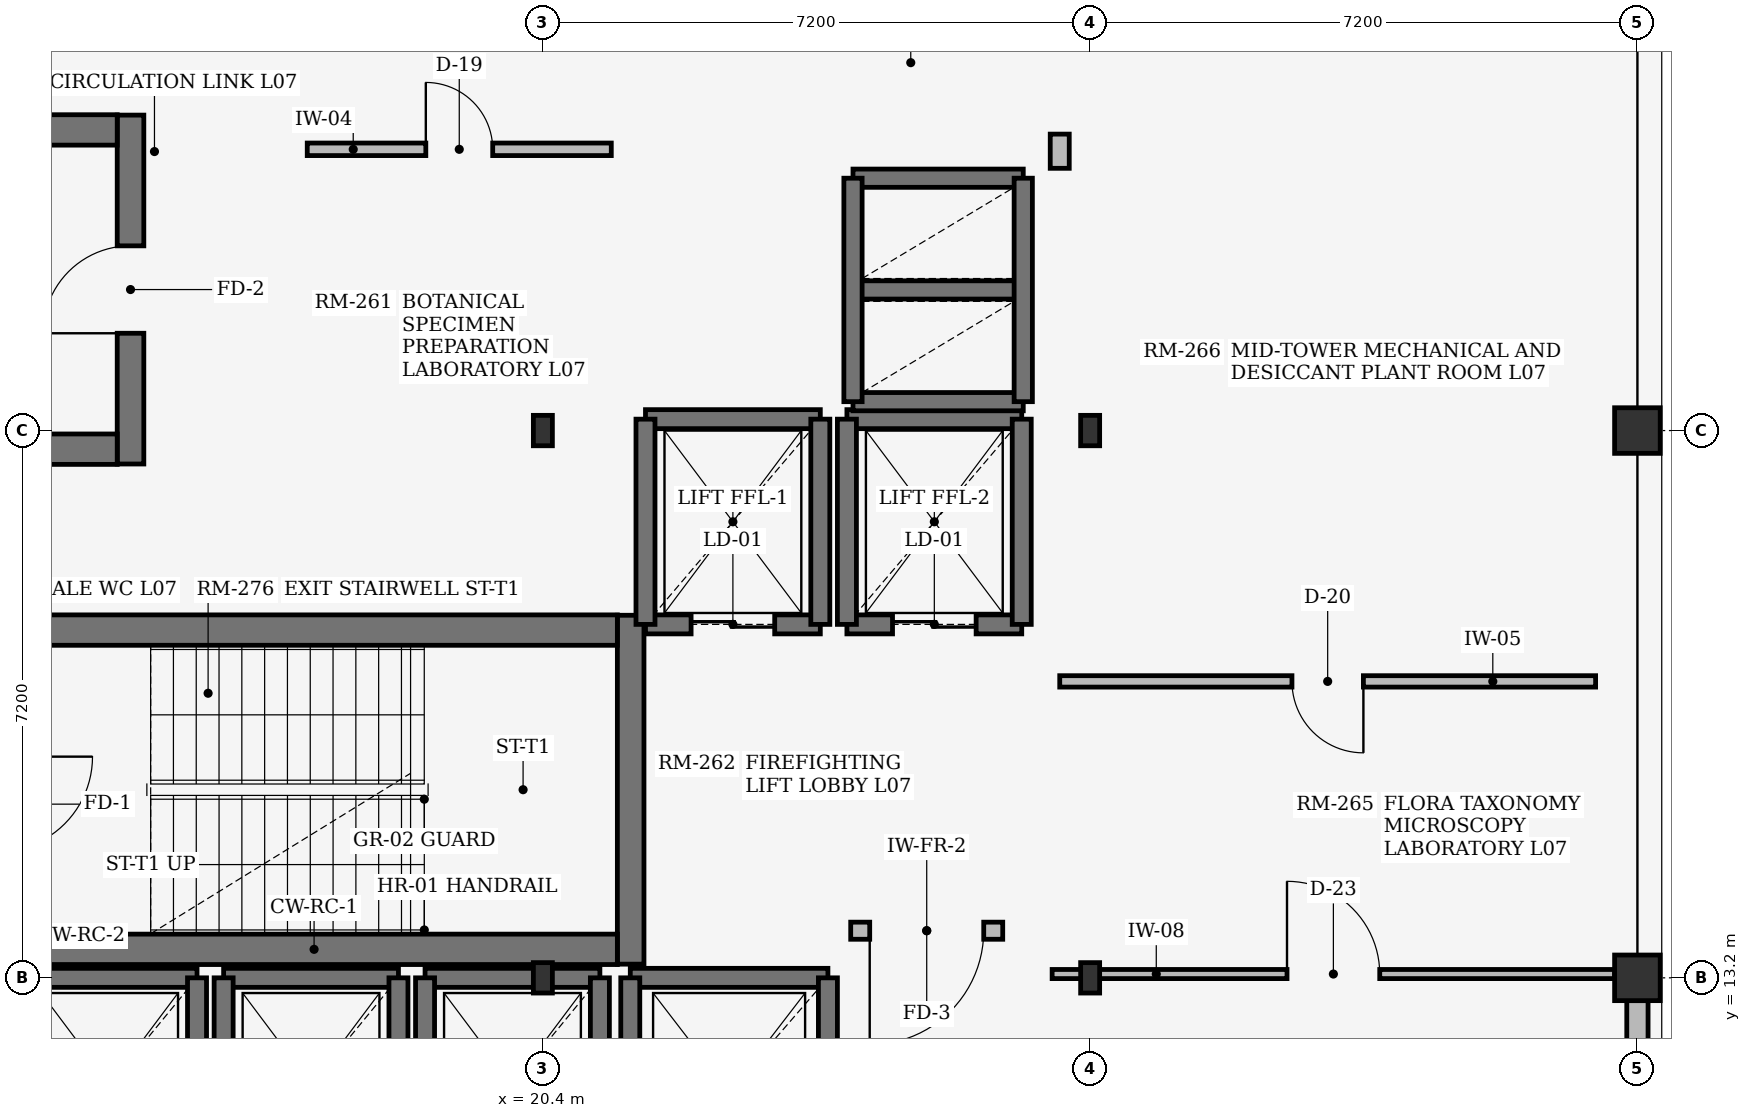
"""IFC4 building model, lengths in metres.
Left out: names, types, materials, properties, quantities, classifications, styles, units other than length and angle.
Written with IfcOpenShell. Run it as: python <this file> out.ifc"""

import sys

from ifc_helpers import new_model, si_unit, direction, frame, frame_2d, origin, origin_2d, place, context, subcontext, project, spatial, rectangle, i_section, extrude, element, fill, save


model = new_model("IFC4")
c1 = context("Model", 3, precision=1e-05, world=origin(), true_north=direction((0.0, 1.0)))
c2 = subcontext(c1, "Body", "Model", "MODEL_VIEW")
j1 = project(units=[si_unit("LENGTHUNIT", "METRE"), si_unit("PLANEANGLEUNIT", "RADIAN")], contexts=[c1])
p1 = place(None, origin())
s1 = spatial("IfcSite", under=j1, at=p1, CompositionType="ELEMENT")
p2 = place(p1, origin())
s2 = spatial("IfcBuilding", under=s1, at=p2, CompositionType="ELEMENT")
p3 = place(p2, frame((0.0, 0.0, 28.8)))
s3 = spatial("IfcBuildingStorey", under=s2, at=p3, CompositionType="ELEMENT", Elevation=28.8)
for number, where, z_axis, x_axis in (
    (1, (20.4, 13.2, 0.0), (0.0, 0.0, 1.0), (1.0, 0.0, 0.0)),
    (2, (20.4, 20.4, 0.0), (0.0, 0.0, 1.0), (1.0, 0.0, 0.0)),
    (3, (27.6, 13.2, 0.0), (0.0, 0.0, 1.0), (1.0, 0.0, 0.0)),
    (4, (27.6, 20.4, 0.0), (0.0, 0.0, 1.0), (1.0, 0.0, 0.0)),
):
    element("IfcColumn", number, at=place(p3, frame(where, z_axis=z_axis, x_axis=x_axis)), inside=s3, PredefinedType="COLUMN", context=c2, shape_type="SweptSolid", body=[
        extrude(i_section(OverallWidth=0.25, OverallDepth=0.4, WebThickness=0.01, FlangeThickness=0.013, at=origin_2d()), origin(), (0.0, 0.0, 1.0), 3.62),
    ])
for number, where, z_axis, x_axis in (
    (5, (34.8, 13.2, 0.0), (0.0, 0.0, 1.0), (1.0, 0.0, 0.0)),
    (6, (34.8, 20.4, 0.0), (0.0, 0.0, 1.0), (1.0, 0.0, 0.0)),
):
    element("IfcColumn", number, at=place(p3, frame(where, z_axis=z_axis, x_axis=x_axis)), inside=s3, PredefinedType="COLUMN", context=c2, shape_type="SweptSolid", body=[
        extrude(rectangle(XDim=0.6, YDim=0.6, at=origin_2d()), origin(), (0.0, 0.0, 1.0), 3.62),
    ])
p4 = place(p3, frame((34.8, 6.3, 0.0), z_axis=(0.0, 0.0, 1.0), x_axis=(0.0, 1.0, 0.0)))
e7 = element("IfcWall", 7, at=p4, inside=s3, PredefinedType="STANDARD", context=c2, shape_type="SweptSolid", body=[
    extrude(rectangle(XDim=6.6, YDim=0.28, at=frame_2d((3.3, 0.0))), origin(), (0.0, 0.0, 1.0), 3.1),
])
p5 = place(p4, frame((2.325, 0.0, 0.75)))
e8 = element("IfcOpeningElement", 8, at=p5, cuts=e7, PredefinedType="OPENING", context=c2, shape_type="SweptSolid", body=[
    extrude(rectangle(XDim=1.95, YDim=1.5, at=frame_2d((0.975, 0.75))), frame((0.0, 0.15, 0.0), z_axis=(0.0, -1.0, 0.0), x_axis=(1.0, 0.0, 0.0)), (0.0, 0.0, 1.0), 0.3),
])
p6 = place(p3, frame((21.555, 13.38, 0.0), z_axis=(0.0, 0.0, 1.0), x_axis=(0.0, 1.0, 0.0)))
e9 = element("IfcWall", 9, at=p6, inside=s3, PredefinedType="SHEAR", context=c2, shape_type="SweptSolid", body=[
    extrude(rectangle(XDim=4.59, YDim=0.35, at=frame_2d((2.295, 0.0))), origin(), (0.0, 0.0, 1.0), 3.62),
])
for number, where, z_axis, x_axis in (
    (10, (13.4, 13.575, 0.0), (0.0, 0.0, 1.0), (1.0, 0.0, 0.0)),
    (11, (13.4, 17.775, 0.0), (0.0, 0.0, 1.0), (1.0, 0.0, 0.0)),
):
    element("IfcWall", number, at=place(p3, frame(where, z_axis=z_axis, x_axis=x_axis)), inside=s3, PredefinedType="SHEAR", context=c2, shape_type="SweptSolid", body=[
        extrude(rectangle(XDim=7.98, YDim=0.4, at=frame_2d((3.99, 0.0))), origin(), (0.0, 0.0, 1.0), 3.62),
    ])
p7 = place(p3, frame((14.975, 24.55, 0.0), z_axis=(0.0, 0.0, 1.0), x_axis=(0.0, -1.0, 0.0)))
e12 = element("IfcWall", 12, at=p7, inside=s3, PredefinedType="SHEAR", context=c2, shape_type="SweptSolid", body=[
    extrude(rectangle(XDim=4.59, YDim=0.35, at=frame_2d((2.295, 0.0))), origin(), (0.0, 0.0, 1.0), 3.62),
])
p8 = place(p7, frame((1.72, 0.0, 0.0)))
e13 = element("IfcOpeningElement", 13, at=p8, cuts=e12, PredefinedType="OPENING", context=c2, shape_type="SweptSolid", body=[
    extrude(rectangle(XDim=1.15, YDim=2.2, at=frame_2d((0.575, 1.1))), frame((0.0, 0.185, 0.0), z_axis=(0.0, -1.0, 0.0), x_axis=(1.0, 0.0, 0.0)), (0.0, 0.0, 1.0), 0.37),
])
for number, where, z_axis, x_axis in (
    (14, (14.8, 24.355, 0.0), (0.0, 0.0, 1.0), (-1.0, 0.0, 0.0)),
    (15, (14.8, 20.155, 0.0), (0.0, 0.0, 1.0), (-1.0, 0.0, 0.0)),
):
    element("IfcWall", number, at=place(p3, frame(where, z_axis=z_axis, x_axis=x_axis)), inside=s3, PredefinedType="SHEAR", context=c2, shape_type="SweptSolid", body=[
        extrude(rectangle(XDim=7.98, YDim=0.4, at=frame_2d((3.99, 0.0))), origin(), (0.0, 0.0, 1.0), 3.62),
    ])
p9 = place(p3, frame((21.75, 17.85, 0.0), z_axis=(0.0, 0.0, 1.0), x_axis=(1.0, 0.0, 0.0)))
e16 = element("IfcWall", 16, at=p9, inside=s3, PredefinedType="SHEAR", context=c2, shape_type="SweptSolid", body=[
    extrude(rectangle(XDim=2.3, YDim=0.25, at=frame_2d((1.15, 0.0))), origin(), (0.0, 0.0, 1.0), 3.62),
])
p10 = place(p9, frame((0.6, 0.0, 0.0)))
e17 = element("IfcOpeningElement", 17, at=p10, cuts=e16, PredefinedType="OPENING", context=c2, shape_type="SweptSolid", body=[
    extrude(rectangle(XDim=1.1, YDim=2.2, at=frame_2d((0.55, 1.1))), frame((0.0, 0.135, 0.0), z_axis=(0.0, -1.0, 0.0), x_axis=(1.0, 0.0, 0.0)), (0.0, 0.0, 1.0), 0.27),
])
p11 = place(p3, frame((21.75, 20.55, 0.0), z_axis=(0.0, 0.0, 1.0), x_axis=(1.0, 0.0, 0.0)))
e18 = element("IfcWall", 18, at=p11, inside=s3, PredefinedType="SHEAR", context=c2, shape_type="SweptSolid", body=[
    extrude(rectangle(XDim=2.3, YDim=0.25, at=frame_2d((1.15, 0.0))), origin(), (0.0, 0.0, 1.0), 3.62),
])
for number, where, z_axis, x_axis in (
    (19, (21.75, 17.85, 0.0), (0.0, 0.0, 1.0), (0.0, 1.0, 0.0)),
    (20, (24.05, 17.85, 0.0), (0.0, 0.0, 1.0), (0.0, 1.0, 0.0)),
):
    element("IfcWall", number, at=place(p3, frame(where, z_axis=z_axis, x_axis=x_axis)), inside=s3, PredefinedType="SHEAR", context=c2, shape_type="SweptSolid", body=[
        extrude(rectangle(XDim=2.7, YDim=0.25, at=frame_2d((1.35, 0.0))), origin(), (0.0, 0.0, 1.0), 3.62),
    ])
p12 = place(p3, frame((24.4, 17.85, 0.0), z_axis=(0.0, 0.0, 1.0), x_axis=(1.0, 0.0, 0.0)))
e21 = element("IfcWall", 21, at=p12, inside=s3, PredefinedType="SHEAR", context=c2, shape_type="SweptSolid", body=[
    extrude(rectangle(XDim=2.3, YDim=0.25, at=frame_2d((1.15, 0.0))), origin(), (0.0, 0.0, 1.0), 3.62),
])
p13 = place(p12, frame((0.6, 0.0, 0.0)))
e22 = element("IfcOpeningElement", 22, at=p13, cuts=e21, PredefinedType="OPENING", context=c2, shape_type="SweptSolid", body=[
    extrude(rectangle(XDim=1.1, YDim=2.2, at=frame_2d((0.55, 1.1))), frame((0.0, 0.135, 0.0), z_axis=(0.0, -1.0, 0.0), x_axis=(1.0, 0.0, 0.0)), (0.0, 0.0, 1.0), 0.27),
])
p14 = place(p3, frame((24.4, 20.55, 0.0), z_axis=(0.0, 0.0, 1.0), x_axis=(1.0, 0.0, 0.0)))
e23 = element("IfcWall", 23, at=p14, inside=s3, PredefinedType="SHEAR", context=c2, shape_type="SweptSolid", body=[
    extrude(rectangle(XDim=2.3, YDim=0.25, at=frame_2d((1.15, 0.0))), origin(), (0.0, 0.0, 1.0), 3.62),
])
for number, where, z_axis, x_axis in (
    (24, (24.4, 17.85, 0.0), (0.0, 0.0, 1.0), (0.0, 1.0, 0.0)),
    (25, (26.7, 17.85, 0.0), (0.0, 0.0, 1.0), (0.0, 1.0, 0.0)),
):
    element("IfcWall", number, at=place(p3, frame(where, z_axis=z_axis, x_axis=x_axis)), inside=s3, PredefinedType="SHEAR", context=c2, shape_type="SweptSolid", body=[
        extrude(rectangle(XDim=2.7, YDim=0.25, at=frame_2d((1.35, 0.0))), origin(), (0.0, 0.0, 1.0), 3.62),
    ])
p15 = place(p3, frame((13.55, 13.2, 0.0), z_axis=(0.0, 0.0, 1.0), x_axis=(1.0, 0.0, 0.0)))
e26 = element("IfcWall", 26, at=p15, inside=s3, PredefinedType="SHEAR", context=c2, shape_type="SweptSolid", body=[
    extrude(rectangle(XDim=2.3, YDim=0.25, at=frame_2d((1.15, 0.0))), origin(), (0.0, 0.0, 1.0), 3.62),
])
p16 = place(p3, frame((15.85, 10.4, 0.0), z_axis=(0.0, 0.0, 1.0), x_axis=(0.0, 1.0, 0.0)))
e27 = element("IfcWall", 27, at=p16, inside=s3, PredefinedType="SHEAR", context=c2, shape_type="SweptSolid", body=[
    extrude(rectangle(XDim=2.8, YDim=0.25, at=frame_2d((1.4, 0.0))), origin(), (0.0, 0.0, 1.0), 3.62),
])
p17 = place(p3, frame((16.2, 13.2, 0.0), z_axis=(0.0, 0.0, 1.0), x_axis=(1.0, 0.0, 0.0)))
e28 = element("IfcWall", 28, at=p17, inside=s3, PredefinedType="SHEAR", context=c2, shape_type="SweptSolid", body=[
    extrude(rectangle(XDim=2.3, YDim=0.25, at=frame_2d((1.15, 0.0))), origin(), (0.0, 0.0, 1.0), 3.62),
])
for number, where, z_axis, x_axis in (
    (29, (16.2, 10.4, 0.0), (0.0, 0.0, 1.0), (0.0, 1.0, 0.0)),
    (30, (18.5, 10.4, 0.0), (0.0, 0.0, 1.0), (0.0, 1.0, 0.0)),
):
    element("IfcWall", number, at=place(p3, frame(where, z_axis=z_axis, x_axis=x_axis)), inside=s3, PredefinedType="SHEAR", context=c2, shape_type="SweptSolid", body=[
        extrude(rectangle(XDim=2.8, YDim=0.25, at=frame_2d((1.4, 0.0))), origin(), (0.0, 0.0, 1.0), 3.62),
    ])
p18 = place(p3, frame((18.85, 13.2, 0.0), z_axis=(0.0, 0.0, 1.0), x_axis=(1.0, 0.0, 0.0)))
e31 = element("IfcWall", 31, at=p18, inside=s3, PredefinedType="SHEAR", context=c2, shape_type="SweptSolid", body=[
    extrude(rectangle(XDim=2.3, YDim=0.25, at=frame_2d((1.15, 0.0))), origin(), (0.0, 0.0, 1.0), 3.62),
])
for number, where, z_axis, x_axis in (
    (32, (18.85, 10.4, 0.0), (0.0, 0.0, 1.0), (0.0, 1.0, 0.0)),
    (33, (21.15, 10.4, 0.0), (0.0, 0.0, 1.0), (0.0, 1.0, 0.0)),
):
    element("IfcWall", number, at=place(p3, frame(where, z_axis=z_axis, x_axis=x_axis)), inside=s3, PredefinedType="SHEAR", context=c2, shape_type="SweptSolid", body=[
        extrude(rectangle(XDim=2.8, YDim=0.25, at=frame_2d((1.4, 0.0))), origin(), (0.0, 0.0, 1.0), 3.62),
    ])
p19 = place(p3, frame((21.55, 13.2, 0.0), z_axis=(0.0, 0.0, 1.0), x_axis=(1.0, 0.0, 0.0)))
e34 = element("IfcWall", 34, at=p19, inside=s3, PredefinedType="SHEAR", context=c2, shape_type="SweptSolid", body=[
    extrude(rectangle(XDim=2.6, YDim=0.25, at=frame_2d((1.3, 0.0))), origin(), (0.0, 0.0, 1.0), 3.62),
])
for number, where, z_axis, x_axis in (
    (35, (21.55, 10.2, 0.0), (0.0, 0.0, 1.0), (0.0, 1.0, 0.0)),
    (36, (24.15, 10.2, 0.0), (0.0, 0.0, 1.0), (0.0, 1.0, 0.0)),
):
    element("IfcWall", number, at=place(p3, frame(where, z_axis=z_axis, x_axis=x_axis)), inside=s3, PredefinedType="SHEAR", context=c2, shape_type="SweptSolid", body=[
        extrude(rectangle(XDim=3.0, YDim=0.25, at=frame_2d((1.5, 0.0))), origin(), (0.0, 0.0, 1.0), 3.62),
    ])
for number, where, z_axis, x_axis in (
    (37, (24.48, 20.78, 0.0), (0.0, 0.0, 1.0), (1.0, 0.0, 0.0)),
    (38, (24.48, 22.25, 0.0), (0.0, 0.0, 1.0), (1.0, 0.0, 0.0)),
    (39, (24.48, 23.72, 0.0), (0.0, 0.0, 1.0), (1.0, 0.0, 0.0)),
):
    element("IfcWall", number, at=place(p3, frame(where, z_axis=z_axis, x_axis=x_axis)), inside=s3, PredefinedType="SHEAR", context=c2, shape_type="SweptSolid", body=[
        extrude(rectangle(XDim=2.24, YDim=0.24, at=frame_2d((1.12, 0.0))), origin(), (0.0, 0.0, 1.0), 3.62),
    ])
for number, where, z_axis, x_axis in (
    (40, (24.48, 20.78, 0.0), (0.0, 0.0, 1.0), (0.0, 1.0, 0.0)),
    (41, (26.72, 20.78, 0.0), (0.0, 0.0, 1.0), (0.0, 1.0, 0.0)),
):
    element("IfcWall", number, at=place(p3, frame(where, z_axis=z_axis, x_axis=x_axis)), inside=s3, PredefinedType="SHEAR", context=c2, shape_type="SweptSolid", body=[
        extrude(rectangle(XDim=2.94, YDim=0.24, at=frame_2d((1.47, 0.0))), origin(), (0.0, 0.0, 1.0), 3.62),
    ])
p20 = place(p3, frame((24.45, 13.82, 0.0), z_axis=(0.0, 0.0, 1.0), x_axis=(1.0, 0.0, 0.0)))
e42 = element("IfcWall", 42, at=p20, inside=s3, PredefinedType="SOLIDWALL", context=c2, shape_type="SweptSolid", body=[
    extrude(rectangle(XDim=2.0, YDim=0.225, at=frame_2d((1.0, 0.0))), origin(), (0.0, 0.0, 1.0), 3.6),
])
p21 = place(p20, frame((0.25, 0.0, 0.0)))
e43 = element("IfcOpeningElement", 43, at=p21, cuts=e42, PredefinedType="OPENING", context=c2, shape_type="SweptSolid", body=[
    extrude(rectangle(XDim=1.5, YDim=2.2, at=frame_2d((0.75, 1.1))), frame((0.0, 0.123, 0.0), z_axis=(0.0, -1.0, 0.0), x_axis=(1.0, 0.0, 0.0)), (0.0, 0.0, 1.0), 0.245),
])
p22 = place(p3, frame((17.3, 24.1, 0.0), z_axis=(0.0, 0.0, 1.0), x_axis=(1.0, 0.0, 0.0)))
e44 = element("IfcWall", 44, at=p22, inside=s3, PredefinedType="PARTITIONING", context=c2, shape_type="SweptSolid", body=[
    extrude(rectangle(XDim=4.0, YDim=0.165, at=frame_2d((2.0, 0.0))), origin(), (0.0, 0.0, 1.0), 3.6),
])
p23 = place(p22, frame((1.56, 0.0, 0.0)))
e45 = element("IfcOpeningElement", 45, at=p23, cuts=e44, PredefinedType="OPENING", context=c2, shape_type="SweptSolid", body=[
    extrude(rectangle(XDim=0.88, YDim=2.12, at=frame_2d((0.44, 1.06))), frame((0.0, 0.093, 0.0), z_axis=(0.0, -1.0, 0.0), x_axis=(1.0, 0.0, 0.0)), (0.0, 0.0, 1.0), 0.185),
])
p24 = place(p3, frame((27.2, 17.1, 0.0), z_axis=(0.0, 0.0, 1.0), x_axis=(1.0, 0.0, 0.0)))
e46 = element("IfcWall", 46, at=p24, inside=s3, PredefinedType="PARTITIONING", context=c2, shape_type="SweptSolid", body=[
    extrude(rectangle(XDim=7.05, YDim=0.15, at=frame_2d((3.525, 0.0))), origin(), (0.0, 0.0, 1.0), 3.6),
])
p25 = place(p24, frame((3.055, 0.0, 0.0)))
e47 = element("IfcOpeningElement", 47, at=p25, cuts=e46, PredefinedType="OPENING", context=c2, shape_type="SweptSolid", body=[
    extrude(rectangle(XDim=0.94, YDim=2.18, at=frame_2d((0.47, 1.09))), frame((0.0, 0.085, 0.0), z_axis=(0.0, -1.0, 0.0), x_axis=(1.0, 0.0, 0.0)), (0.0, 0.0, 1.0), 0.17),
])
p26 = place(p3, frame((27.1, 13.25, 0.0), z_axis=(0.0, 0.0, 1.0), x_axis=(1.0, 0.0, 0.0)))
e48 = element("IfcWall", 48, at=p26, inside=s3, PredefinedType="PARTITIONING", context=c2, shape_type="SweptSolid", body=[
    extrude(rectangle(XDim=7.4, YDim=0.12, at=frame_2d((3.7, 0.0))), origin(), (0.0, 0.0, 1.0), 3.11),
])
p27 = place(p26, frame((3.09, 0.0, 0.0)))
e49 = element("IfcOpeningElement", 49, at=p27, cuts=e48, PredefinedType="OPENING", context=c2, shape_type="SweptSolid", body=[
    extrude(rectangle(XDim=1.22, YDim=2.22, at=frame_2d((0.61, 1.11))), frame((0.0, 0.07, 0.0), z_axis=(0.0, -1.0, 0.0), x_axis=(1.0, 0.0, 0.0)), (0.0, 0.0, 1.0), 0.14),
])
p28 = place(p3, frame((27.2, 24.3, 0.0), z_axis=(0.0, 0.0, 1.0), x_axis=(0.0, -1.0, 0.0)))
e50 = element("IfcWall", 50, at=p28, inside=s3, PredefinedType="SOLIDWALL", context=c2, shape_type="SweptSolid", body=[
    extrude(rectangle(XDim=0.45, YDim=0.25, at=frame_2d((0.225, 0.0))), origin(), (0.0, 0.0, 1.0), 3.6),
])
p29 = place(p8, origin())
e51 = element("IfcDoor", 51, at=p29, inside=s3, OperationType="SINGLE_SWING_RIGHT", PredefinedType="DOOR", context=c2, shape_type="SweptSolid", body=[
    extrude(rectangle(XDim=1.15, YDim=2.2, at=frame_2d((0.575, 1.1))), frame((0.0, 0.025, 0.0), z_axis=(0.0, -1.0, 0.0), x_axis=(1.0, 0.0, 0.0)), (0.0, 0.0, 1.0), 0.05),
])
fill(e13, e51)
p30 = place(p10, origin())
e52 = element("IfcDoor", 52, at=p30, inside=s3, OperationType="DOUBLE_DOOR_SLIDING", PredefinedType="DOOR", context=c2, shape_type="SweptSolid", body=[
    extrude(rectangle(XDim=1.1, YDim=2.2, at=frame_2d((0.55, 1.1))), frame((0.0, 0.025, 0.0), z_axis=(0.0, -1.0, 0.0), x_axis=(1.0, 0.0, 0.0)), (0.0, 0.0, 1.0), 0.05),
])
fill(e17, e52)
p31 = place(p13, origin())
e53 = element("IfcDoor", 53, at=p31, inside=s3, OperationType="DOUBLE_DOOR_SLIDING", PredefinedType="DOOR", context=c2, shape_type="SweptSolid", body=[
    extrude(rectangle(XDim=1.1, YDim=2.2, at=frame_2d((0.55, 1.1))), frame((0.0, 0.025, 0.0), z_axis=(0.0, -1.0, 0.0), x_axis=(1.0, 0.0, 0.0)), (0.0, 0.0, 1.0), 0.05),
])
fill(e22, e53)
p32 = place(p21, frame((1.5, 0.0, 0.0), z_axis=(0.0, 0.0, 1.0), x_axis=(-1.0, 0.0, 0.0)))
e54 = element("IfcDoor", 54, at=p32, inside=s3, OperationType="SINGLE_SWING_LEFT", PredefinedType="DOOR", context=c2, shape_type="SweptSolid", body=[
    extrude(rectangle(XDim=1.5, YDim=2.2, at=frame_2d((0.75, 1.1))), frame((0.0, 0.025, 0.0), z_axis=(0.0, -1.0, 0.0), x_axis=(1.0, 0.0, 0.0)), (0.0, 0.0, 1.0), 0.05),
])
fill(e43, e54)
p33 = place(p23, origin())
e55 = element("IfcDoor", 55, at=p33, inside=s3, OperationType="SINGLE_SWING_LEFT", PredefinedType="DOOR", context=c2, shape_type="SweptSolid", body=[
    extrude(rectangle(XDim=0.88, YDim=2.12, at=frame_2d((0.44, 1.06))), frame((0.0, 0.025, 0.0), z_axis=(0.0, -1.0, 0.0), x_axis=(1.0, 0.0, 0.0)), (0.0, 0.0, 1.0), 0.05),
])
fill(e45, e55)
p34 = place(p25, origin())
e56 = element("IfcDoor", 56, at=p34, inside=s3, OperationType="SINGLE_SWING_RIGHT", PredefinedType="DOOR", context=c2, shape_type="SweptSolid", body=[
    extrude(rectangle(XDim=0.94, YDim=2.18, at=frame_2d((0.47, 1.09))), frame((0.0, 0.025, 0.0), z_axis=(0.0, -1.0, 0.0), x_axis=(1.0, 0.0, 0.0)), (0.0, 0.0, 1.0), 0.05),
])
fill(e47, e56)
p35 = place(p27, origin())
e57 = element("IfcDoor", 57, at=p35, inside=s3, OperationType="SINGLE_SWING_LEFT", PredefinedType="DOOR", context=c2, shape_type="SweptSolid", body=[
    extrude(rectangle(XDim=1.22, YDim=2.22, at=frame_2d((0.61, 1.11))), frame((0.0, 0.025, 0.0), z_axis=(0.0, -1.0, 0.0), x_axis=(1.0, 0.0, 0.0)), (0.0, 0.0, 1.0), 0.05),
])
fill(e49, e57)
save(model, sys.argv[1])
